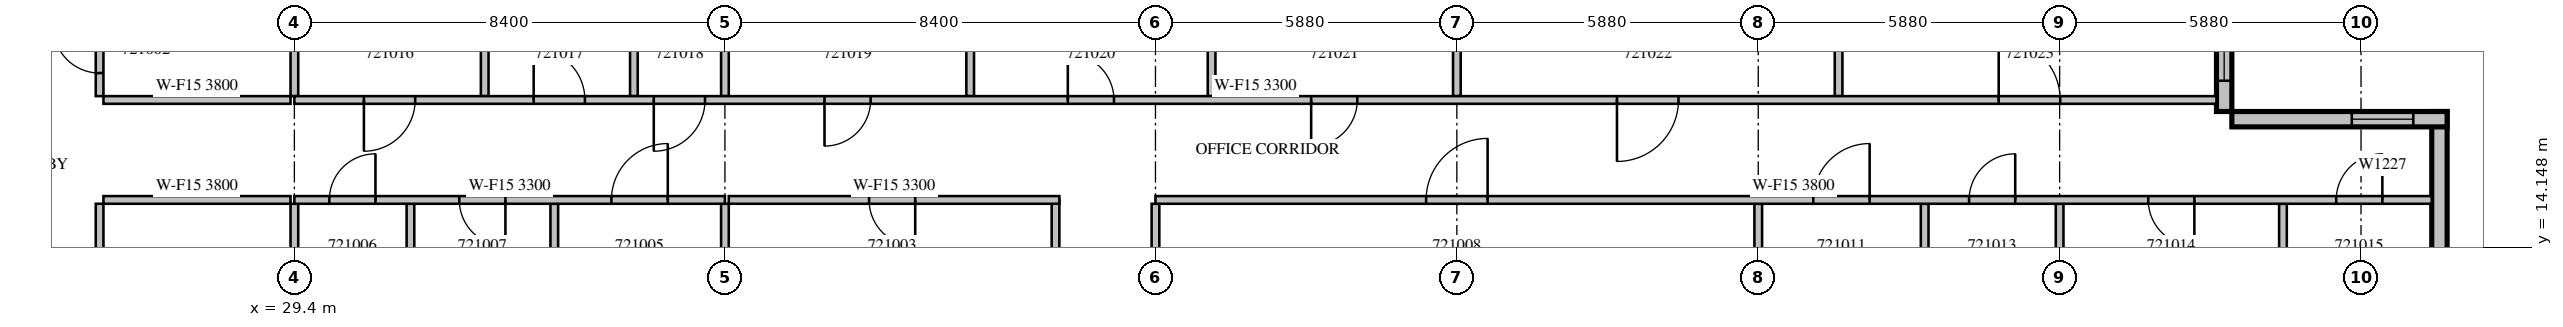
"""IFC4 building model, lengths in metres.
Left out: names, types, materials, properties, quantities, classifications, styles, units other than length and angle.
Written with IfcOpenShell. Run it as: python <this file> out.ifc"""

import sys

from ifc_helpers import new_model, si_unit, direction, frame, frame_2d, origin, place, context, subcontext, project, spatial, rectangle, extrude, source, transform, mapped, element, fill, save


model = new_model("IFC4")
c1 = context("Model", 3, precision=1e-05, world=origin(), true_north=direction((0.0, 1.0)))
c2 = subcontext(c1, "Body", "Model", "MODEL_VIEW")
j1 = project(units=[si_unit("LENGTHUNIT", "METRE"), si_unit("PLANEANGLEUNIT", "RADIAN")], contexts=[c1])
p1 = place(None, origin())
s1 = spatial("IfcSite", under=j1, at=p1, CompositionType="ELEMENT")
p2 = place(p1, origin())
s2 = spatial("IfcBuilding", under=s1, at=p2, CompositionType="ELEMENT")
p3 = place(p2, frame((0.0, 0.0, 99.3)))
s3 = spatial("IfcBuildingStorey", under=s2, at=p3, CompositionType="ELEMENT", Elevation=99.3)
m1 = source(origin(), c2, "Body", "SweptSolid", [
    extrude(rectangle(XDim=6.3, YDim=0.3, at=frame_2d((3.15, 0.0))), origin(), (0.0, 0.0, 1.0), 3.8),
])
p4 = place(p3, frame((71.25, 10.5, 0.0), z_axis=(0.0, 0.0, 1.0), x_axis=(0.0, 1.0, 0.0)))
e1 = element("IfcWall", 1, at=p4, inside=s3, PredefinedType="STANDARD", context=c2, shape_type="MappedRepresentation", body=[
    mapped(m1, transform((0.0, 0.0, 0.0), scale=1.0)),
])
m2 = source(origin(), c2, "Body", "SweptSolid", [
    extrude(rectangle(XDim=1.2, YDim=2.7, at=frame_2d((0.6, 1.35))), frame((0.0, 0.16, 0.0), z_axis=(0.0, -1.0, 0.0), x_axis=(1.0, 0.0, 0.0)), (0.0, 0.0, 1.0), 0.32),
])
p5 = place(p4, frame((1.062, 0.0, 0.6)))
e2 = element("IfcOpeningElement", 2, at=p5, cuts=e1, PredefinedType="OPENING", context=c2, shape_type="MappedRepresentation", body=[
    mapped(m2, transform((0.0, 0.0, 0.0), scale=1.0)),
])
m3 = source(origin(), c2, "Body", "SweptSolid", [
    extrude(rectangle(XDim=4.2, YDim=0.3, at=frame_2d((2.1, 0.0))), origin(), (0.0, 0.0, 1.0), 3.8),
])
p6 = place(p3, frame((71.4, 16.65, 0.0), z_axis=(0.0, 0.0, 1.0), x_axis=(-1.0, 0.0, 0.0)))
e3 = element("IfcWall", 3, at=p6, inside=s3, PredefinedType="STANDARD", context=c2, shape_type="MappedRepresentation", body=[
    mapped(m3, transform((0.0, 0.0, 0.0), scale=1.0)),
])
p7 = place(p6, frame((0.66, 0.0, 0.6)))
e4 = element("IfcOpeningElement", 4, at=p7, cuts=e3, PredefinedType="OPENING", context=c2, shape_type="MappedRepresentation", body=[
    mapped(m2, transform((0.0, 0.0, 0.0), scale=1.0)),
])
p8 = place(p3, frame((67.05, 16.8, 0.0), z_axis=(0.0, 0.0, 1.0), x_axis=(0.0, 1.0, 0.0)))
e5 = element("IfcWall", 5, at=p8, inside=s3, PredefinedType="STANDARD", context=c2, shape_type="MappedRepresentation", body=[
    mapped(m3, transform((0.0, 0.0, 0.0), scale=1.0)),
])
m4 = source(origin(), c2, "Body", "SweptSolid", [
    extrude(rectangle(XDim=3.0, YDim=2.7, at=frame_2d((1.5, 1.35))), frame((0.0, 0.16, 0.0), z_axis=(0.0, -1.0, 0.0), x_axis=(1.0, 0.0, 0.0)), (0.0, 0.0, 1.0), 0.32),
])
p9 = place(p8, frame((0.6, 0.0, 0.6)))
e6 = element("IfcOpeningElement", 6, at=p9, cuts=e5, PredefinedType="OPENING", context=c2, shape_type="MappedRepresentation", body=[
    mapped(m4, transform((0.0, 0.0, 0.0), scale=1.0)),
])
m5 = source(origin(), c2, "Body", "SweptSolid", [
    extrude(rectangle(XDim=4.295, YDim=0.15, at=frame_2d((2.147, 0.0))), origin(), (0.0, 0.0, 1.0), 3.8),
])
p10 = place(p3, frame((25.6, 15.0, 0.0), z_axis=(0.0, 0.0, 1.0), x_axis=(0.0, -1.0, 0.0)))
e7 = element("IfcWall", 7, at=p10, inside=s3, PredefinedType="PARTITIONING", context=c2, shape_type="MappedRepresentation", body=[
    mapped(m5, transform((0.0, 0.0, 0.0), scale=1.0)),
])
m6 = source(origin(), c2, "Body", "SweptSolid", [
    extrude(rectangle(XDim=0.9, YDim=2.1, at=frame_2d((0.45, 1.05))), frame((0.0, 0.085, 0.0), z_axis=(0.0, -1.0, 0.0), x_axis=(1.0, 0.0, 0.0)), (0.0, 0.0, 1.0), 0.17),
])
p11 = place(p10, frame((1.113, 0.0, 0.0)))
e8 = element("IfcOpeningElement", 8, at=p11, cuts=e7, PredefinedType="OPENING", context=c2, shape_type="MappedRepresentation", body=[
    mapped(m6, transform((0.0, 0.0, 0.0), scale=1.0)),
])
m7 = source(origin(), c2, "Body", "SweptSolid", [
    extrude(rectangle(XDim=3.6, YDim=0.15, at=frame_2d((1.8, 0.0))), origin(), (0.0, 0.0, 1.0), 3.8),
])
p12 = place(p3, frame((25.6, 20.7, 0.0), z_axis=(0.0, 0.0, 1.0), x_axis=(0.0, -1.0, 0.0)))
e9 = element("IfcWall", 9, at=p12, inside=s3, PredefinedType="PARTITIONING", context=c2, shape_type="MappedRepresentation", body=[
    mapped(m7, transform((0.0, 0.0, 0.0), scale=1.0)),
])
p13 = place(p12, frame((2.25, 0.0, 0.0)))
e10 = element("IfcOpeningElement", 10, at=p13, cuts=e9, PredefinedType="OPENING", context=c2, shape_type="MappedRepresentation", body=[
    mapped(m6, transform((0.0, 0.0, 0.0), scale=1.0)),
])
m8 = source(origin(), c2, "Body", "SweptSolid", [
    extrude(rectangle(XDim=3.65, YDim=0.15, at=frame_2d((1.825, 0.0))), origin(), (0.0, 0.0, 1.0), 3.8),
])
for number, where, z_axis, x_axis in (
    (11, (29.325, 15.075, 0.0), (0.0, 0.0, 1.0), (-1.0, 0.0, 0.0)),
    (12, (25.675, 17.025, 0.0), (0.0, 0.0, 1.0), (1.0, 0.0, 0.0)),
):
    element("IfcWall", number, at=place(p3, frame(where, z_axis=z_axis, x_axis=x_axis)), inside=s3, PredefinedType="PARTITIONING", context=c2, shape_type="MappedRepresentation", body=[
        mapped(m8, transform((0.0, 0.0, 0.0), scale=1.0)),
    ])
m9 = source(origin(), c2, "Body", "SweptSolid", [
    extrude(rectangle(XDim=3.901, YDim=0.15, at=frame_2d((1.95, 0.0))), origin(), (0.0, 0.0, 1.0), 3.8),
])
p14 = place(p3, frame((29.4, 11.099, 0.0), z_axis=(0.0, 0.0, 1.0), x_axis=(0.0, 1.0, 0.0)))
e13 = element("IfcWall", 13, at=p14, inside=s3, PredefinedType="PARTITIONING", context=c2, shape_type="MappedRepresentation", body=[
    mapped(m9, transform((0.0, 0.0, 0.0), scale=1.0)),
])
m10 = source(origin(), c2, "Body", "SweptSolid", [
    extrude(rectangle(XDim=2.701, YDim=0.15, at=frame_2d((1.351, 0.0))), origin(), (0.0, 0.0, 1.0), 3.8),
])
p15 = place(p3, frame((29.4, 17.1, 0.0), z_axis=(0.0, 0.0, 1.0), x_axis=(0.0, 1.0, 0.0)))
e14 = element("IfcWall", 14, at=p15, inside=s3, PredefinedType="PARTITIONING", context=c2, shape_type="MappedRepresentation", body=[
    mapped(m10, transform((0.0, 0.0, 0.0), scale=1.0)),
])
m11 = source(origin(), c2, "Body", "SweptSolid", [
    extrude(rectangle(XDim=2.775, YDim=0.15, at=frame_2d((1.387, 0.0))), origin(), (0.0, 0.0, 1.0), 3.8),
])
p16 = place(p3, frame((44.25, 12.3, 0.0), z_axis=(0.0, 0.0, 1.0), x_axis=(0.0, 1.0, 0.0)))
e15 = element("IfcWall", 15, at=p16, inside=s3, PredefinedType="PARTITIONING", context=c2, shape_type="MappedRepresentation", body=[
    mapped(m11, transform((0.0, 0.0, 0.0), scale=1.0)),
])
m12 = source(origin(), c2, "Body", "SweptSolid", [
    extrude(rectangle(XDim=6.45, YDim=0.15, at=frame_2d((3.225, 0.0))), origin(), (0.0, 0.0, 1.0), 3.3),
])
p17 = place(p3, frame((44.325, 15.075, 0.0), z_axis=(0.0, 0.0, 1.0), x_axis=(-1.0, 0.0, 0.0)))
e16 = element("IfcWall", 16, at=p17, inside=s3, PredefinedType="PARTITIONING", context=c2, shape_type="MappedRepresentation", body=[
    mapped(m12, transform((0.0, 0.0, 0.0), scale=1.0)),
])
p18 = place(p17, frame((2.812, 0.0, 0.0)))
e17 = element("IfcOpeningElement", 17, at=p18, cuts=e16, PredefinedType="OPENING", context=c2, shape_type="MappedRepresentation", body=[
    mapped(m6, transform((0.0, 0.0, 0.0), scale=1.0)),
])
for number, where, z_axis, x_axis in (
    (18, (31.665, 10.705, 0.0), (0.0, 0.0, 1.0), (0.0, 1.0, 0.0)),
    (19, (34.471, 10.705, 0.0), (0.0, 0.0, 1.0), (0.0, 1.0, 0.0)),
):
    element("IfcWall", number, at=place(p3, frame(where, z_axis=z_axis, x_axis=x_axis)), inside=s3, PredefinedType="PARTITIONING", context=c2, shape_type="MappedRepresentation", body=[
        mapped(m5, transform((0.0, 0.0, 0.0), scale=1.0)),
    ])
p19 = place(p3, frame((37.8, 11.099, 0.0), z_axis=(0.0, 0.0, 1.0), x_axis=(0.0, 1.0, 0.0)))
e20 = element("IfcWall", 20, at=p19, inside=s3, PredefinedType="PARTITIONING", context=c2, shape_type="MappedRepresentation", body=[
    mapped(m9, transform((0.0, 0.0, 0.0), scale=1.0)),
])
m13 = source(origin(), c2, "Body", "SweptSolid", [
    extrude(rectangle(XDim=3.75, YDim=0.15, at=frame_2d((1.875, 0.0))), origin(), (0.0, 0.0, 1.0), 3.8),
])
for number, where, z_axis, x_axis in (
    (21, (61.207, 11.25, 0.0), (0.0, 0.0, 1.0), (0.0, 1.0, 0.0)),
    (22, (63.84, 11.25, 0.0), (0.0, 0.0, 1.0), (0.0, 1.0, 0.0)),
    (23, (68.197, 11.25, 0.0), (0.0, 0.0, 1.0), (0.0, 1.0, 0.0)),
    (24, (46.2, 11.25, 0.0), (0.0, 0.0, 1.0), (0.0, 1.0, 0.0)),
    (25, (57.96, 11.25, 0.0), (0.0, 0.0, 1.0), (0.0, 1.0, 0.0)),
):
    element("IfcWall", number, at=place(p3, frame(where, z_axis=z_axis, x_axis=x_axis)), inside=s3, PredefinedType="PARTITIONING", context=c2, shape_type="MappedRepresentation", body=[
        mapped(m13, transform((0.0, 0.0, 0.0), scale=1.0)),
    ])
m14 = source(origin(), c2, "Body", "SweptSolid", [
    extrude(rectangle(XDim=3.6, YDim=0.15, at=frame_2d((1.8, 0.0))), origin(), (0.0, 0.0, 1.0), 2.8),
])
for number, where, z_axis, x_axis in (
    (26, (33.113, 20.7, 0.0), (0.0, 0.0, 1.0), (0.0, -1.0, 0.0)),
    (27, (36.024, 20.7, 0.0), (0.0, 0.0, 1.0), (0.0, -1.0, 0.0)),
    (28, (42.585, 20.7, 0.0), (0.0, 0.0, 1.0), (0.0, -1.0, 0.0)),
):
    element("IfcWall", number, at=place(p3, frame(where, z_axis=z_axis, x_axis=x_axis)), inside=s3, PredefinedType="PARTITIONING", context=c2, shape_type="MappedRepresentation", body=[
        mapped(m14, transform((0.0, 0.0, 0.0), scale=1.0)),
    ])
for number, where, z_axis, x_axis in (
    (29, (47.295, 20.7, 0.0), (0.0, 0.0, 1.0), (0.0, -1.0, 0.0)),
    (30, (59.528, 20.7, 0.0), (0.0, 0.0, 1.0), (0.0, -1.0, 0.0)),
):
    element("IfcWall", number, at=place(p3, frame(where, z_axis=z_axis, x_axis=x_axis)), inside=s3, PredefinedType="PARTITIONING", context=c2, shape_type="MappedRepresentation", body=[
        mapped(m7, transform((0.0, 0.0, 0.0), scale=1.0)),
    ])
for number, where, z_axis, x_axis in (
    (31, (37.8, 17.1, 0.0), (0.0, 0.0, 1.0), (0.0, 1.0, 0.0)),
    (32, (52.08, 17.1, 0.0), (0.0, 0.0, 1.0), (0.0, 1.0, 0.0)),
):
    element("IfcWall", number, at=place(p3, frame(where, z_axis=z_axis, x_axis=x_axis)), inside=s3, PredefinedType="PARTITIONING", context=c2, shape_type="MappedRepresentation", body=[
        mapped(m10, transform((0.0, 0.0, 0.0), scale=1.0)),
    ])
m15 = source(origin(), c2, "Body", "SweptSolid", [
    extrude(rectangle(XDim=8.4, YDim=0.15, at=frame_2d((4.2, 0.0))), origin(), (0.0, 0.0, 1.0), 3.3),
])
p20 = place(p3, frame((37.8, 15.075, 0.0), z_axis=(0.0, 0.0, 1.0), x_axis=(-1.0, 0.0, 0.0)))
e33 = element("IfcWall", 33, at=p20, inside=s3, PredefinedType="PARTITIONING", context=c2, shape_type="MappedRepresentation", body=[
    mapped(m15, transform((0.0, 0.0, 0.0), scale=1.0)),
])
m16 = source(origin(), c2, "Body", "SweptSolid", [
    extrude(rectangle(XDim=1.1, YDim=2.1, at=frame_2d((0.55, 1.05))), frame((0.0, 0.085, 0.0), z_axis=(0.0, -1.0, 0.0), x_axis=(1.0, 0.0, 0.0)), (0.0, 0.0, 1.0), 0.17),
])
p21 = place(p20, frame((1.115, 0.0, 0.0)))
e34 = element("IfcOpeningElement", 34, at=p21, cuts=e33, PredefinedType="OPENING", context=c2, shape_type="MappedRepresentation", body=[
    mapped(m16, transform((0.0, 0.0, 0.0), scale=1.0)),
])
p22 = place(p20, frame((6.818, 0.0, 0.0)))
e35 = element("IfcOpeningElement", 35, at=p22, cuts=e33, PredefinedType="OPENING", context=c2, shape_type="MappedRepresentation", body=[
    mapped(m6, transform((0.0, 0.0, 0.0), scale=1.0)),
])
p23 = place(p20, frame((4.282, 0.0, 0.0)))
e36 = element("IfcOpeningElement", 36, at=p23, cuts=e33, PredefinedType="OPENING", context=c2, shape_type="MappedRepresentation", body=[
    mapped(m6, transform((0.0, 0.0, 0.0), scale=1.0)),
])
m17 = source(origin(), c2, "Body", "SweptSolid", [
    extrude(rectangle(XDim=24.9, YDim=0.15, at=frame_2d((12.45, 0.0))), origin(), (0.0, 0.0, 1.0), 3.8),
])
p24 = place(p3, frame((71.1, 15.075, 0.0), z_axis=(0.0, 0.0, 1.0), x_axis=(-1.0, 0.0, 0.0)))
e37 = element("IfcWall", 37, at=p24, inside=s3, PredefinedType="PARTITIONING", context=c2, shape_type="MappedRepresentation", body=[
    mapped(m17, transform((0.0, 0.0, 0.0), scale=1.0)),
])
m18 = source(origin(), c2, "Body", "SweptSolid", [
    extrude(rectangle(XDim=1.2, YDim=2.1, at=frame_2d((0.6, 1.05))), frame((0.0, 0.085, 0.0), z_axis=(0.0, -1.0, 0.0), x_axis=(1.0, 0.0, 0.0)), (0.0, 0.0, 1.0), 0.17),
])
p25 = place(p24, frame((18.42, 0.0, 0.0)))
e38 = element("IfcOpeningElement", 38, at=p25, cuts=e37, PredefinedType="OPENING", context=c2, shape_type="MappedRepresentation", body=[
    mapped(m18, transform((0.0, 0.0, 0.0), scale=1.0)),
])
p26 = place(p24, frame((10.967, 0.0, 0.0)))
e39 = element("IfcOpeningElement", 39, at=p26, cuts=e37, PredefinedType="OPENING", context=c2, shape_type="MappedRepresentation", body=[
    mapped(m16, transform((0.0, 0.0, 0.0), scale=1.0)),
])
p27 = place(p24, frame((8.127, 0.0, 0.0)))
e40 = element("IfcOpeningElement", 40, at=p27, cuts=e37, PredefinedType="OPENING", context=c2, shape_type="MappedRepresentation", body=[
    mapped(m6, transform((0.0, 0.0, 0.0), scale=1.0)),
])
p28 = place(p24, frame((4.631, 0.0, 0.0)))
e41 = element("IfcOpeningElement", 41, at=p28, cuts=e37, PredefinedType="OPENING", context=c2, shape_type="MappedRepresentation", body=[
    mapped(m6, transform((0.0, 0.0, 0.0), scale=1.0)),
])
p29 = place(p24, frame((0.964, 0.0, 0.0)))
e42 = element("IfcOpeningElement", 42, at=p29, cuts=e37, PredefinedType="OPENING", context=c2, shape_type="MappedRepresentation", body=[
    mapped(m6, transform((0.0, 0.0, 0.0), scale=1.0)),
])
m19 = source(origin(), c2, "Body", "SweptSolid", [
    extrude(rectangle(XDim=37.5, YDim=0.15, at=frame_2d((18.75, 0.0))), origin(), (0.0, 0.0, 1.0), 3.3),
])
p30 = place(p3, frame((29.4, 17.025, 0.0), z_axis=(0.0, 0.0, 1.0), x_axis=(1.0, 0.0, 0.0)))
e43 = element("IfcWall", 43, at=p30, inside=s3, PredefinedType="PARTITIONING", context=c2, shape_type="MappedRepresentation", body=[
    mapped(m19, transform((0.0, 0.0, 0.0), scale=1.0)),
])
m20 = source(origin(), c2, "Body", "SweptSolid", [
    extrude(rectangle(XDim=1.0, YDim=2.1, at=frame_2d((0.5, 1.05))), frame((0.0, 0.085, 0.0), z_axis=(0.0, -1.0, 0.0), x_axis=(1.0, 0.0, 0.0)), (0.0, 0.0, 1.0), 0.17),
])
p31 = place(p30, frame((1.357, 0.0, 0.0)))
e44 = element("IfcOpeningElement", 44, at=p31, cuts=e43, PredefinedType="OPENING", context=c2, shape_type="MappedRepresentation", body=[
    mapped(m20, transform((0.0, 0.0, 0.0), scale=1.0)),
])
p32 = place(p30, frame((4.669, 0.0, 0.0)))
e45 = element("IfcOpeningElement", 45, at=p32, cuts=e43, PredefinedType="OPENING", context=c2, shape_type="MappedRepresentation", body=[
    mapped(m20, transform((0.0, 0.0, 0.0), scale=1.0)),
])
p33 = place(p30, frame((7.012, 0.0, 0.0)))
e46 = element("IfcOpeningElement", 46, at=p33, cuts=e43, PredefinedType="OPENING", context=c2, shape_type="MappedRepresentation", body=[
    mapped(m20, transform((0.0, 0.0, 0.0), scale=1.0)),
])
p34 = place(p30, frame((10.342, 0.0, 0.0)))
e47 = element("IfcOpeningElement", 47, at=p34, cuts=e43, PredefinedType="OPENING", context=c2, shape_type="MappedRepresentation", body=[
    mapped(m6, transform((0.0, 0.0, 0.0), scale=1.0)),
])
p35 = place(p30, frame((15.09, 0.0, 0.0)))
e48 = element("IfcOpeningElement", 48, at=p35, cuts=e43, PredefinedType="OPENING", context=c2, shape_type="MappedRepresentation", body=[
    mapped(m6, transform((0.0, 0.0, 0.0), scale=1.0)),
])
p36 = place(p30, frame((19.837, 0.0, 0.0)))
e49 = element("IfcOpeningElement", 49, at=p36, cuts=e43, PredefinedType="OPENING", context=c2, shape_type="MappedRepresentation", body=[
    mapped(m6, transform((0.0, 0.0, 0.0), scale=1.0)),
])
p37 = place(p30, frame((25.804, 0.0, 0.0)))
e50 = element("IfcOpeningElement", 50, at=p37, cuts=e43, PredefinedType="OPENING", context=c2, shape_type="MappedRepresentation", body=[
    mapped(m18, transform((0.0, 0.0, 0.0), scale=1.0)),
])
p38 = place(p30, frame((33.251, 0.0, 0.0)))
e51 = element("IfcOpeningElement", 51, at=p38, cuts=e43, PredefinedType="OPENING", context=c2, shape_type="MappedRepresentation", body=[
    mapped(m18, transform((0.0, 0.0, 0.0), scale=1.0)),
])
m21 = source(origin(), c2, "Body", "SweptSolid", [
    extrude(rectangle(XDim=1.2, YDim=2.7, at=frame_2d((0.6, 1.35))), frame((0.0, 0.03, 0.0), z_axis=(0.0, -1.0, 0.0), x_axis=(1.0, 0.0, 0.0)), (0.0, 0.0, 1.0), 0.06),
])
p39 = place(p7, origin())
e52 = element("IfcWindow", 52, at=p39, inside=s3, PartitioningType="SINGLE_PANEL", PredefinedType="WINDOW", context=c2, shape_type="MappedRepresentation", body=[
    mapped(m21, transform((0.0, 0.0, 0.0), scale=1.0)),
])
fill(e4, e52)
m22 = source(origin(), c2, "Body", "SweptSolid", [
    extrude(rectangle(XDim=3.0, YDim=2.7, at=frame_2d((1.5, 1.35))), frame((0.0, 0.03, 0.0), z_axis=(0.0, -1.0, 0.0), x_axis=(1.0, 0.0, 0.0)), (0.0, 0.0, 1.0), 0.06),
])
p40 = place(p9, origin())
e53 = element("IfcWindow", 53, at=p40, inside=s3, PartitioningType="SINGLE_PANEL", PredefinedType="WINDOW", context=c2, shape_type="MappedRepresentation", body=[
    mapped(m22, transform((0.0, 0.0, 0.0), scale=1.0)),
])
fill(e6, e53)
m23 = source(origin(), c2, "Body", "SweptSolid", [
    extrude(rectangle(XDim=0.9, YDim=2.1, at=frame_2d((0.45, 1.05))), frame((0.0, 0.025, 0.0), z_axis=(0.0, -1.0, 0.0), x_axis=(1.0, 0.0, 0.0)), (0.0, 0.0, 1.0), 0.05),
])
p41 = place(p13, origin())
e54 = element("IfcDoor", 54, at=p41, inside=s3, OperationType="SINGLE_SWING_RIGHT", PredefinedType="DOOR", context=c2, shape_type="MappedRepresentation", body=[
    mapped(m23, transform((0.0, 0.0, 0.0), scale=1.0)),
])
fill(e10, e54)
p42 = place(p18, origin())
e55 = element("IfcDoor", 55, at=p42, inside=s3, OperationType="SINGLE_SWING_LEFT", PredefinedType="DOOR", context=c2, shape_type="MappedRepresentation", body=[
    mapped(m23, transform((0.0, 0.0, 0.0), scale=1.0)),
])
fill(e17, e55)
m24 = source(origin(), c2, "Body", "SweptSolid", [
    extrude(rectangle(XDim=1.1, YDim=2.1, at=frame_2d((0.55, 1.05))), frame((0.0, 0.025, 0.0), z_axis=(0.0, -1.0, 0.0), x_axis=(1.0, 0.0, 0.0)), (0.0, 0.0, 1.0), 0.05),
])
p43 = place(p21, origin())
e56 = element("IfcDoor", 56, at=p43, inside=s3, OperationType="SINGLE_SWING_RIGHT", PredefinedType="DOOR", context=c2, shape_type="MappedRepresentation", body=[
    mapped(m24, transform((0.0, 0.0, 0.0), scale=1.0)),
])
fill(e34, e56)
p44 = place(p22, origin())
e57 = element("IfcDoor", 57, at=p44, inside=s3, OperationType="SINGLE_SWING_RIGHT", PredefinedType="DOOR", context=c2, shape_type="MappedRepresentation", body=[
    mapped(m23, transform((0.0, 0.0, 0.0), scale=1.0)),
])
fill(e35, e57)
p45 = place(p23, origin())
e58 = element("IfcDoor", 58, at=p45, inside=s3, OperationType="SINGLE_SWING_LEFT", PredefinedType="DOOR", context=c2, shape_type="MappedRepresentation", body=[
    mapped(m23, transform((0.0, 0.0, 0.0), scale=1.0)),
])
fill(e36, e58)
m25 = source(origin(), c2, "Body", "SweptSolid", [
    extrude(rectangle(XDim=1.2, YDim=2.1, at=frame_2d((0.6, 1.05))), frame((0.0, 0.025, 0.0), z_axis=(0.0, -1.0, 0.0), x_axis=(1.0, 0.0, 0.0)), (0.0, 0.0, 1.0), 0.05),
])
p46 = place(p25, origin())
e59 = element("IfcDoor", 59, at=p46, inside=s3, OperationType="SINGLE_SWING_RIGHT", PredefinedType="DOOR", context=c2, shape_type="MappedRepresentation", body=[
    mapped(m25, transform((0.0, 0.0, 0.0), scale=1.0)),
])
fill(e38, e59)
p47 = place(p26, origin())
e60 = element("IfcDoor", 60, at=p47, inside=s3, OperationType="SINGLE_SWING_RIGHT", PredefinedType="DOOR", context=c2, shape_type="MappedRepresentation", body=[
    mapped(m24, transform((0.0, 0.0, 0.0), scale=1.0)),
])
fill(e39, e60)
p48 = place(p27, origin())
e61 = element("IfcDoor", 61, at=p48, inside=s3, OperationType="SINGLE_SWING_RIGHT", PredefinedType="DOOR", context=c2, shape_type="MappedRepresentation", body=[
    mapped(m23, transform((0.0, 0.0, 0.0), scale=1.0)),
])
fill(e40, e61)
p49 = place(p28, origin())
e62 = element("IfcDoor", 62, at=p49, inside=s3, OperationType="SINGLE_SWING_LEFT", PredefinedType="DOOR", context=c2, shape_type="MappedRepresentation", body=[
    mapped(m23, transform((0.0, 0.0, 0.0), scale=1.0)),
])
fill(e41, e62)
p50 = place(p29, origin())
e63 = element("IfcDoor", 63, at=p50, inside=s3, OperationType="SINGLE_SWING_RIGHT", PredefinedType="DOOR", context=c2, shape_type="MappedRepresentation", body=[
    mapped(m23, transform((0.0, 0.0, 0.0), scale=1.0)),
])
fill(e42, e63)
m26 = source(origin(), c2, "Body", "SweptSolid", [
    extrude(rectangle(XDim=1.0, YDim=2.1, at=frame_2d((0.5, 1.05))), frame((0.0, 0.025, 0.0), z_axis=(0.0, -1.0, 0.0), x_axis=(1.0, 0.0, 0.0)), (0.0, 0.0, 1.0), 0.05),
])
p51 = place(p31, origin())
e64 = element("IfcDoor", 64, at=p51, inside=s3, OperationType="SINGLE_SWING_RIGHT", PredefinedType="DOOR", context=c2, shape_type="MappedRepresentation", body=[
    mapped(m26, transform((0.0, 0.0, 0.0), scale=1.0)),
])
fill(e44, e64)
p52 = place(p32, origin())
e65 = element("IfcDoor", 65, at=p52, inside=s3, OperationType="SINGLE_SWING_LEFT", PredefinedType="DOOR", context=c2, shape_type="MappedRepresentation", body=[
    mapped(m26, transform((0.0, 0.0, 0.0), scale=1.0)),
])
fill(e45, e65)
p53 = place(p33, origin())
e66 = element("IfcDoor", 66, at=p53, inside=s3, OperationType="SINGLE_SWING_RIGHT", PredefinedType="DOOR", context=c2, shape_type="MappedRepresentation", body=[
    mapped(m26, transform((0.0, 0.0, 0.0), scale=1.0)),
])
fill(e46, e66)
p54 = place(p34, origin())
e67 = element("IfcDoor", 67, at=p54, inside=s3, OperationType="SINGLE_SWING_RIGHT", PredefinedType="DOOR", context=c2, shape_type="MappedRepresentation", body=[
    mapped(m23, transform((0.0, 0.0, 0.0), scale=1.0)),
])
fill(e47, e67)
p55 = place(p35, origin())
e68 = element("IfcDoor", 68, at=p55, inside=s3, OperationType="SINGLE_SWING_LEFT", PredefinedType="DOOR", context=c2, shape_type="MappedRepresentation", body=[
    mapped(m23, transform((0.0, 0.0, 0.0), scale=1.0)),
])
fill(e48, e68)
p56 = place(p36, origin())
e69 = element("IfcDoor", 69, at=p56, inside=s3, OperationType="SINGLE_SWING_RIGHT", PredefinedType="DOOR", context=c2, shape_type="MappedRepresentation", body=[
    mapped(m23, transform((0.0, 0.0, 0.0), scale=1.0)),
])
fill(e49, e69)
p57 = place(p37, origin())
e70 = element("IfcDoor", 70, at=p57, inside=s3, OperationType="SINGLE_SWING_RIGHT", PredefinedType="DOOR", context=c2, shape_type="MappedRepresentation", body=[
    mapped(m25, transform((0.0, 0.0, 0.0), scale=1.0)),
])
fill(e50, e70)
p58 = place(p38, origin())
e71 = element("IfcDoor", 71, at=p58, inside=s3, OperationType="SINGLE_SWING_LEFT", PredefinedType="DOOR", context=c2, shape_type="MappedRepresentation", body=[
    mapped(m25, transform((0.0, 0.0, 0.0), scale=1.0)),
])
fill(e51, e71)
save(model, sys.argv[1])
